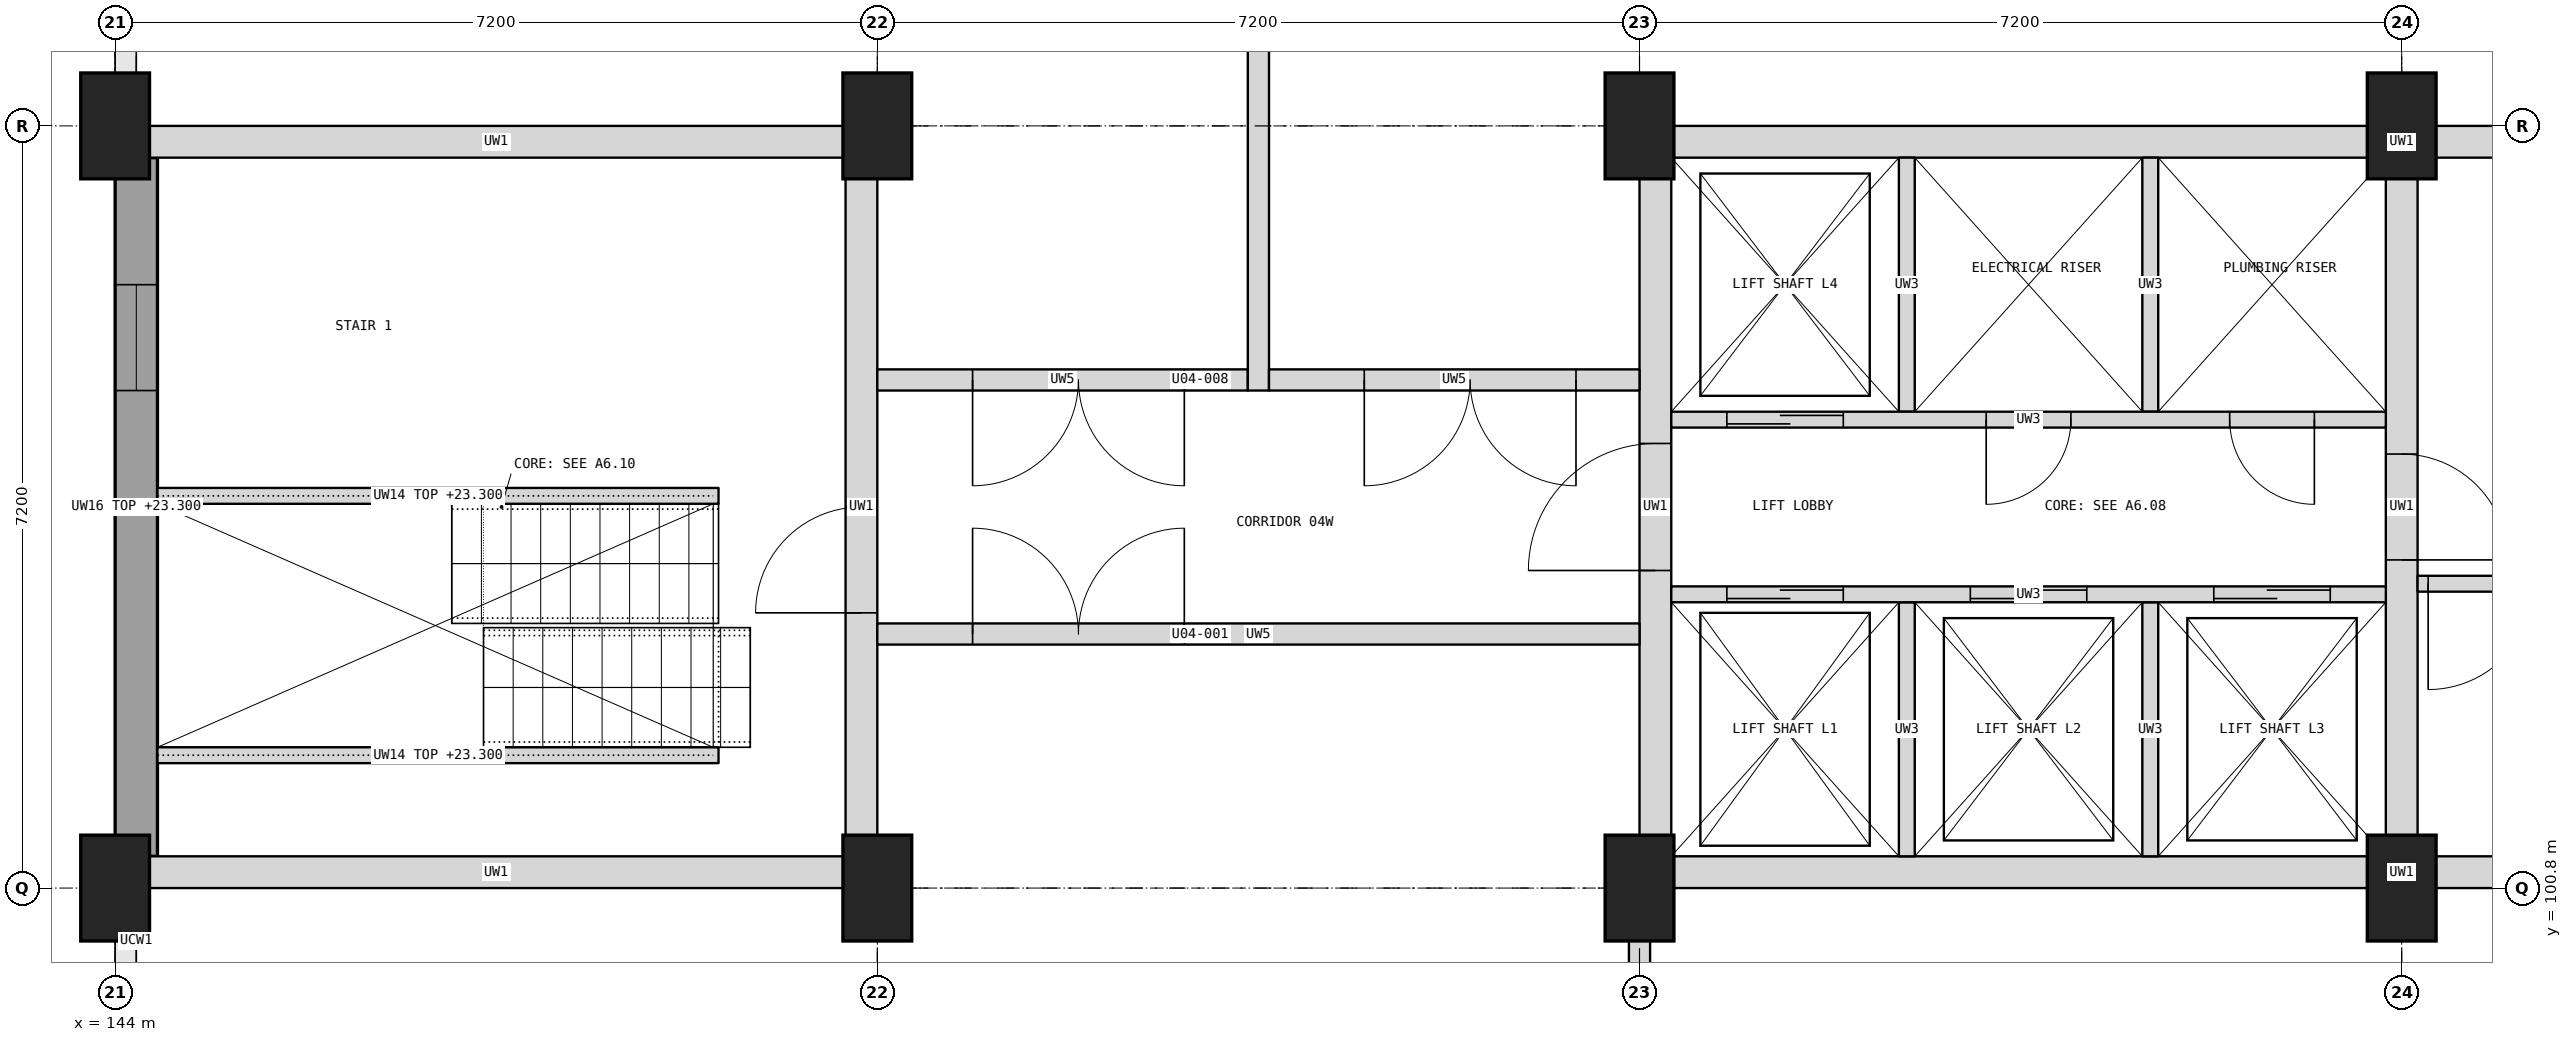
"""IFC4 building model, lengths in metres.
Left out: names, types, materials, properties, quantities, classifications, styles, units other than length and angle.
Written with IfcOpenShell. Run it as: python <this file> out.ifc"""

import sys

from ifc_helpers import new_model, si_unit, direction, frame, frame_2d, origin, origin_2d, place, context, subcontext, project, spatial, rectangle, extrude, element, fill, save


model = new_model("IFC4")
c1 = context("Model", 3, precision=1e-05, world=origin(), true_north=direction((0.0, 1.0)))
c2 = subcontext(c1, "Body", "Model", "MODEL_VIEW")
j1 = project(units=[si_unit("LENGTHUNIT", "METRE"), si_unit("PLANEANGLEUNIT", "RADIAN")], contexts=[c1])
p1 = place(None, origin())
s1 = spatial("IfcSite", under=j1, at=p1, CompositionType="ELEMENT")
p2 = place(p1, origin())
s2 = spatial("IfcBuilding", under=s1, at=p2, CompositionType="ELEMENT")
p3 = place(p2, frame((0.0, 0.0, 19.9)))
s3 = spatial("IfcBuildingStorey", under=s2, at=p3, CompositionType="ELEMENT", Elevation=19.9)
for number, where, z_axis, x_axis in (
    (1, (144.0, 100.8, 0.0), (0.0, 0.0, 1.0), (1.0, 0.0, 0.0)),
    (2, (144.0, 108.0, 0.0), (0.0, 0.0, 1.0), (1.0, 0.0, 0.0)),
    (3, (151.2, 100.8, 0.0), (0.0, 0.0, 1.0), (1.0, 0.0, 0.0)),
    (4, (151.2, 108.0, 0.0), (0.0, 0.0, 1.0), (1.0, 0.0, 0.0)),
    (5, (158.4, 100.8, 0.0), (0.0, 0.0, 1.0), (1.0, 0.0, 0.0)),
    (6, (158.4, 108.0, 0.0), (0.0, 0.0, 1.0), (1.0, 0.0, 0.0)),
    (7, (165.6, 100.8, 0.0), (0.0, 0.0, 1.0), (1.0, 0.0, 0.0)),
    (8, (165.6, 108.0, 0.0), (0.0, 0.0, 1.0), (1.0, 0.0, 0.0)),
):
    element("IfcColumn", number, at=place(p3, frame(where, z_axis=z_axis, x_axis=x_axis)), inside=s3, PredefinedType="COLUMN", context=c2, shape_type="SweptSolid", body=[
        extrude(rectangle(XDim=0.65, YDim=1.0, at=origin_2d()), origin(), (0.0, 0.0, 1.0), 3.4),
    ])
for number, where, z_axis, x_axis in (
    (9, (158.4, 100.95, 0.0), (0.0, 0.0, 1.0), (1.0, 0.0, 0.0)),
    (10, (158.4, 107.85, 0.0), (0.0, 0.0, 1.0), (1.0, 0.0, 0.0)),
):
    element("IfcWall", number, at=place(p3, frame(where, z_axis=z_axis, x_axis=x_axis)), inside=s3, PredefinedType="SHEAR", context=c2, shape_type="SweptSolid", body=[
        extrude(rectangle(XDim=14.4, YDim=0.3, at=frame_2d((7.2, 0.0))), origin(), (0.0, 0.0, 1.0), 3.4),
    ])
p4 = place(p3, frame((158.55, 101.1, 0.0), z_axis=(0.0, 0.0, 1.0), x_axis=(0.0, 1.0, 0.0)))
e11 = element("IfcWall", 11, at=p4, inside=s3, PredefinedType="SHEAR", context=c2, shape_type="SweptSolid", body=[
    extrude(rectangle(XDim=6.6, YDim=0.3, at=frame_2d((3.3, 0.0))), origin(), (0.0, 0.0, 1.0), 3.4),
])
p5 = place(p4, frame((2.7, 0.0, 0.0)))
e12 = element("IfcOpeningElement", 12, at=p5, cuts=e11, PredefinedType="OPENING", context=c2, shape_type="SweptSolid", body=[
    extrude(rectangle(XDim=1.2, YDim=2.1, at=frame_2d((0.6, 1.05))), frame((0.0, 0.16, 0.0), z_axis=(0.0, -1.0, 0.0), x_axis=(1.0, 0.0, 0.0)), (0.0, 0.0, 1.0), 0.32),
])
p6 = place(p3, frame((165.6, 101.1, 0.0), z_axis=(0.0, 0.0, 1.0), x_axis=(0.0, 1.0, 0.0)))
e13 = element("IfcWall", 13, at=p6, inside=s3, PredefinedType="SHEAR", context=c2, shape_type="SweptSolid", body=[
    extrude(rectangle(XDim=6.6, YDim=0.3, at=frame_2d((3.3, 0.0))), origin(), (0.0, 0.0, 1.0), 3.4),
])
p7 = place(p6, frame((2.8, 0.0, 0.0)))
e14 = element("IfcOpeningElement", 14, at=p7, cuts=e13, PredefinedType="OPENING", context=c2, shape_type="SweptSolid", body=[
    extrude(rectangle(XDim=1.0, YDim=2.1, at=frame_2d((0.5, 1.05))), frame((0.0, 0.16, 0.0), z_axis=(0.0, -1.0, 0.0), x_axis=(1.0, 0.0, 0.0)), (0.0, 0.0, 1.0), 0.32),
])
for number, where, z_axis, x_axis in (
    (15, (160.925, 101.1, 0.0), (0.0, 0.0, 1.0), (0.0, 1.0, 0.0)),
    (16, (163.225, 101.1, 0.0), (0.0, 0.0, 1.0), (0.0, 1.0, 0.0)),
    (17, (160.925, 105.3, 0.0), (0.0, 0.0, 1.0), (0.0, 1.0, 0.0)),
    (18, (163.225, 105.3, 0.0), (0.0, 0.0, 1.0), (0.0, 1.0, 0.0)),
):
    element("IfcWall", number, at=place(p3, frame(where, z_axis=z_axis, x_axis=x_axis)), inside=s3, PredefinedType="PARTITIONING", context=c2, shape_type="SweptSolid", body=[
        extrude(rectangle(XDim=2.4, YDim=0.15, at=frame_2d((1.2, 0.0))), origin(), (0.0, 0.0, 1.0), 3.4),
    ])
p8 = place(p3, frame((158.7, 103.575, 0.0), z_axis=(0.0, 0.0, 1.0), x_axis=(1.0, 0.0, 0.0)))
e19 = element("IfcWall", 19, at=p8, inside=s3, PredefinedType="PARTITIONING", context=c2, shape_type="SweptSolid", body=[
    extrude(rectangle(XDim=6.75, YDim=0.15, at=frame_2d((3.375, 0.0))), origin(), (0.0, 0.0, 1.0), 3.4),
])
p9 = place(p8, frame((0.525, 0.0, 0.0)))
e20 = element("IfcOpeningElement", 20, at=p9, cuts=e19, PredefinedType="OPENING", context=c2, shape_type="SweptSolid", body=[
    extrude(rectangle(XDim=1.1, YDim=2.1, at=frame_2d((0.55, 1.05))), frame((0.0, 0.085, 0.0), z_axis=(0.0, -1.0, 0.0), x_axis=(1.0, 0.0, 0.0)), (0.0, 0.0, 1.0), 0.17),
])
p10 = place(p8, frame((2.825, 0.0, 0.0)))
e21 = element("IfcOpeningElement", 21, at=p10, cuts=e19, PredefinedType="OPENING", context=c2, shape_type="SweptSolid", body=[
    extrude(rectangle(XDim=1.1, YDim=2.1, at=frame_2d((0.55, 1.05))), frame((0.0, 0.085, 0.0), z_axis=(0.0, -1.0, 0.0), x_axis=(1.0, 0.0, 0.0)), (0.0, 0.0, 1.0), 0.17),
])
p11 = place(p8, frame((5.125, 0.0, 0.0)))
e22 = element("IfcOpeningElement", 22, at=p11, cuts=e19, PredefinedType="OPENING", context=c2, shape_type="SweptSolid", body=[
    extrude(rectangle(XDim=1.1, YDim=2.1, at=frame_2d((0.55, 1.05))), frame((0.0, 0.085, 0.0), z_axis=(0.0, -1.0, 0.0), x_axis=(1.0, 0.0, 0.0)), (0.0, 0.0, 1.0), 0.17),
])
p12 = place(p3, frame((158.7, 105.225, 0.0), z_axis=(0.0, 0.0, 1.0), x_axis=(1.0, 0.0, 0.0)))
e23 = element("IfcWall", 23, at=p12, inside=s3, PredefinedType="PARTITIONING", context=c2, shape_type="SweptSolid", body=[
    extrude(rectangle(XDim=6.75, YDim=0.15, at=frame_2d((3.375, 0.0))), origin(), (0.0, 0.0, 1.0), 3.4),
])
p13 = place(p12, frame((0.525, 0.0, 0.0)))
e24 = element("IfcOpeningElement", 24, at=p13, cuts=e23, PredefinedType="OPENING", context=c2, shape_type="SweptSolid", body=[
    extrude(rectangle(XDim=1.1, YDim=2.1, at=frame_2d((0.55, 1.05))), frame((0.0, 0.085, 0.0), z_axis=(0.0, -1.0, 0.0), x_axis=(1.0, 0.0, 0.0)), (0.0, 0.0, 1.0), 0.17),
])
p14 = place(p12, frame((2.975, 0.0, 0.0)))
e25 = element("IfcOpeningElement", 25, at=p14, cuts=e23, PredefinedType="OPENING", context=c2, shape_type="SweptSolid", body=[
    extrude(rectangle(XDim=0.8, YDim=2.1, at=frame_2d((0.4, 1.05))), frame((0.0, 0.085, 0.0), z_axis=(0.0, -1.0, 0.0), x_axis=(1.0, 0.0, 0.0)), (0.0, 0.0, 1.0), 0.17),
])
p15 = place(p12, frame((5.275, 0.0, 0.0)))
e26 = element("IfcOpeningElement", 26, at=p15, cuts=e23, PredefinedType="OPENING", context=c2, shape_type="SweptSolid", body=[
    extrude(rectangle(XDim=0.8, YDim=2.1, at=frame_2d((0.4, 1.05))), frame((0.0, 0.085, 0.0), z_axis=(0.0, -1.0, 0.0), x_axis=(1.0, 0.0, 0.0)), (0.0, 0.0, 1.0), 0.17),
])
p16 = place(p3, frame((165.75, 103.675, 0.0), z_axis=(0.0, 0.0, 1.0), x_axis=(1.0, 0.0, 0.0)))
e27 = element("IfcWall", 27, at=p16, inside=s3, PredefinedType="SHEAR", context=c2, shape_type="SweptSolid", body=[
    extrude(rectangle(XDim=6.75, YDim=0.15, at=frame_2d((3.375, 0.0))), origin(), (0.0, 0.0, 1.0), 3.4),
])
p17 = place(p16, frame((0.1, 0.0, 0.0)))
e28 = element("IfcOpeningElement", 28, at=p17, cuts=e27, PredefinedType="OPENING", context=c2, shape_type="SweptSolid", body=[
    extrude(rectangle(XDim=1.0, YDim=2.1, at=frame_2d((0.5, 1.05))), frame((0.0, 0.085, 0.0), z_axis=(0.0, -1.0, 0.0), x_axis=(1.0, 0.0, 0.0)), (0.0, 0.0, 1.0), 0.17),
])
for number, where, z_axis, x_axis in (
    (29, (144.0, 100.95, 0.0), (0.0, 0.0, 1.0), (1.0, 0.0, 0.0)),
    (30, (144.0, 107.85, 0.0), (0.0, 0.0, 1.0), (1.0, 0.0, 0.0)),
):
    element("IfcWall", number, at=place(p3, frame(where, z_axis=z_axis, x_axis=x_axis)), inside=s3, PredefinedType="SHEAR", context=c2, shape_type="SweptSolid", body=[
        extrude(rectangle(XDim=7.2, YDim=0.3, at=frame_2d((3.6, 0.0))), origin(), (0.0, 0.0, 1.0), 3.4),
    ])
p18 = place(p3, frame((151.05, 101.1, 0.0), z_axis=(0.0, 0.0, 1.0), x_axis=(0.0, 1.0, 0.0)))
e31 = element("IfcWall", 31, at=p18, inside=s3, PredefinedType="SHEAR", context=c2, shape_type="SweptSolid", body=[
    extrude(rectangle(XDim=6.6, YDim=0.3, at=frame_2d((3.3, 0.0))), origin(), (0.0, 0.0, 1.0), 3.4),
])
p19 = place(p18, frame((2.3, 0.0, 0.0)))
e32 = element("IfcOpeningElement", 32, at=p19, cuts=e31, PredefinedType="OPENING", context=c2, shape_type="SweptSolid", body=[
    extrude(rectangle(XDim=1.0, YDim=2.1, at=frame_2d((0.5, 1.05))), frame((0.0, 0.16, 0.0), z_axis=(0.0, -1.0, 0.0), x_axis=(1.0, 0.0, 0.0)), (0.0, 0.0, 1.0), 0.32),
])
p20 = place(p3, frame((144.2, 101.1, 0.0), z_axis=(0.0, 0.0, 1.0), x_axis=(0.0, 1.0, 0.0)))
e33 = element("IfcWall", 33, at=p20, inside=s3, PredefinedType="SHEAR", context=c2, shape_type="SweptSolid", body=[
    extrude(rectangle(XDim=6.6, YDim=0.4, at=frame_2d((3.3, 0.0))), origin(), (0.0, 0.0, 1.0), 3.4),
])
p21 = place(p20, frame((4.4, 0.0, 1.0)))
e34 = element("IfcOpeningElement", 34, at=p21, cuts=e33, PredefinedType="OPENING", context=c2, shape_type="SweptSolid", body=[
    extrude(rectangle(XDim=1.0, YDim=1.5, at=frame_2d((0.5, 0.75))), frame((0.0, 0.21, 0.0), z_axis=(0.0, -1.0, 0.0), x_axis=(1.0, 0.0, 0.0)), (0.0, 0.0, 1.0), 0.42),
])
for number, where, z_axis, x_axis in (
    (35, (144.4, 102.055, 0.0), (0.0, 0.0, 1.0), (1.0, 0.0, 0.0)),
    (36, (144.4, 104.505, 0.0), (0.0, 0.0, 1.0), (1.0, 0.0, 0.0)),
):
    element("IfcWall", number, at=place(p3, frame(where, z_axis=z_axis, x_axis=x_axis)), inside=s3, PredefinedType="SHEAR", context=c2, shape_type="SweptSolid", body=[
        extrude(rectangle(XDim=5.3, YDim=0.15, at=frame_2d((2.65, 0.0))), origin(), (0.0, 0.0, 1.0), 3.4),
    ])
p22 = place(p3, frame((151.2, 103.2, 0.0), z_axis=(0.0, 0.0, 1.0), x_axis=(1.0, 0.0, 0.0)))
e37 = element("IfcWall", 37, at=p22, inside=s3, PredefinedType="PARTITIONING", context=c2, shape_type="SweptSolid", body=[
    extrude(rectangle(XDim=7.2, YDim=0.2, at=frame_2d((3.6, 0.0))), origin(), (0.0, 0.0, 1.0), 3.1),
])
p23 = place(p22, frame((0.9, 0.0, 0.0)))
e38 = element("IfcOpeningElement", 38, at=p23, cuts=e37, PredefinedType="OPENING", context=c2, shape_type="SweptSolid", body=[
    extrude(rectangle(XDim=2.0, YDim=2.1, at=frame_2d((1.0, 1.05))), frame((0.0, 0.11, 0.0), z_axis=(0.0, -1.0, 0.0), x_axis=(1.0, 0.0, 0.0)), (0.0, 0.0, 1.0), 0.22),
])
p24 = place(p3, frame((158.4, 94.0, 0.0), z_axis=(0.0, 0.0, 1.0), x_axis=(0.0, 1.0, 0.0)))
e39 = element("IfcWall", 39, at=p24, inside=s3, PredefinedType="PARTITIONING", context=c2, shape_type="SweptSolid", body=[
    extrude(rectangle(XDim=6.35, YDim=0.2, at=frame_2d((3.175, 0.0))), origin(), (0.0, 0.0, 1.0), 2.55),
])
p25 = place(p3, frame((151.2, 105.6, 0.0), z_axis=(0.0, 0.0, 1.0), x_axis=(1.0, 0.0, 0.0)))
e40 = element("IfcWall", 40, at=p25, inside=s3, PredefinedType="PARTITIONING", context=c2, shape_type="SweptSolid", body=[
    extrude(rectangle(XDim=3.5, YDim=0.2, at=frame_2d((1.75, 0.0))), origin(), (0.0, 0.0, 1.0), 3.1),
])
p26 = place(p25, frame((0.9, 0.0, 0.0)))
e41 = element("IfcOpeningElement", 41, at=p26, cuts=e40, PredefinedType="OPENING", context=c2, shape_type="SweptSolid", body=[
    extrude(rectangle(XDim=2.0, YDim=2.1, at=frame_2d((1.0, 1.05))), frame((0.0, 0.11, 0.0), z_axis=(0.0, -1.0, 0.0), x_axis=(1.0, 0.0, 0.0)), (0.0, 0.0, 1.0), 0.22),
])
p27 = place(p3, frame((154.8, 105.5, 0.0), z_axis=(0.0, 0.0, 1.0), x_axis=(0.0, 1.0, 0.0)))
e42 = element("IfcWall", 42, at=p27, inside=s3, PredefinedType="PARTITIONING", context=c2, shape_type="SweptSolid", body=[
    extrude(rectangle(XDim=9.3, YDim=0.2, at=frame_2d((4.65, 0.0))), origin(), (0.0, 0.0, 1.0), 3.1),
])
p28 = place(p3, frame((154.9, 105.6, 0.0), z_axis=(0.0, 0.0, 1.0), x_axis=(1.0, 0.0, 0.0)))
e43 = element("IfcWall", 43, at=p28, inside=s3, PredefinedType="PARTITIONING", context=c2, shape_type="SweptSolid", body=[
    extrude(rectangle(XDim=3.5, YDim=0.2, at=frame_2d((1.75, 0.0))), origin(), (0.0, 0.0, 1.0), 3.1),
])
p29 = place(p28, frame((0.9, 0.0, 0.0)))
e44 = element("IfcOpeningElement", 44, at=p29, cuts=e43, PredefinedType="OPENING", context=c2, shape_type="SweptSolid", body=[
    extrude(rectangle(XDim=2.0, YDim=2.1, at=frame_2d((1.0, 1.05))), frame((0.0, 0.11, 0.0), z_axis=(0.0, -1.0, 0.0), x_axis=(1.0, 0.0, 0.0)), (0.0, 0.0, 1.0), 0.22),
])
p30 = place(p21, origin())
e45 = element("IfcWindow", 45, at=p30, inside=s3, PartitioningType="SINGLE_PANEL", PredefinedType="WINDOW", context=c2, shape_type="SweptSolid", body=[
    extrude(rectangle(XDim=1.0, YDim=1.5, at=frame_2d((0.5, 0.75))), frame((0.0, 0.03, 0.0), z_axis=(0.0, -1.0, 0.0), x_axis=(1.0, 0.0, 0.0)), (0.0, 0.0, 1.0), 0.06),
])
fill(e34, e45)
p31 = place(p23, origin())
e46 = element("IfcDoor", 46, at=p31, inside=s3, OperationType="DOUBLE_DOOR_SINGLE_SWING", PredefinedType="DOOR", context=c2, shape_type="SweptSolid", body=[
    extrude(rectangle(XDim=2.0, YDim=2.1, at=frame_2d((1.0, 1.05))), frame((0.0, 0.025, 0.0), z_axis=(0.0, -1.0, 0.0), x_axis=(1.0, 0.0, 0.0)), (0.0, 0.0, 1.0), 0.05),
])
fill(e38, e46)
p32 = place(p26, frame((2.0, 0.0, 0.0), z_axis=(0.0, 0.0, 1.0), x_axis=(-1.0, 0.0, 0.0)))
e47 = element("IfcDoor", 47, at=p32, inside=s3, OperationType="DOUBLE_DOOR_SINGLE_SWING", PredefinedType="DOOR", context=c2, shape_type="SweptSolid", body=[
    extrude(rectangle(XDim=2.0, YDim=2.1, at=frame_2d((1.0, 1.05))), frame((0.0, 0.025, 0.0), z_axis=(0.0, -1.0, 0.0), x_axis=(1.0, 0.0, 0.0)), (0.0, 0.0, 1.0), 0.05),
])
fill(e41, e47)
p33 = place(p29, frame((2.0, 0.0, 0.0), z_axis=(0.0, 0.0, 1.0), x_axis=(-1.0, 0.0, 0.0)))
e48 = element("IfcDoor", 48, at=p33, inside=s3, OperationType="DOUBLE_DOOR_SINGLE_SWING", PredefinedType="DOOR", context=c2, shape_type="SweptSolid", body=[
    extrude(rectangle(XDim=2.0, YDim=2.1, at=frame_2d((1.0, 1.05))), frame((0.0, 0.025, 0.0), z_axis=(0.0, -1.0, 0.0), x_axis=(1.0, 0.0, 0.0)), (0.0, 0.0, 1.0), 0.05),
])
fill(e44, e48)
p34 = place(p9, origin())
e49 = element("IfcDoor", 49, at=p34, inside=s3, OperationType="DOUBLE_DOOR_SLIDING", PredefinedType="DOOR", context=c2, shape_type="SweptSolid", body=[
    extrude(rectangle(XDim=1.1, YDim=2.1, at=frame_2d((0.55, 1.05))), frame((0.0, 0.025, 0.0), z_axis=(0.0, -1.0, 0.0), x_axis=(1.0, 0.0, 0.0)), (0.0, 0.0, 1.0), 0.05),
])
fill(e20, e49)
p35 = place(p10, origin())
e50 = element("IfcDoor", 50, at=p35, inside=s3, OperationType="DOUBLE_DOOR_SLIDING", PredefinedType="DOOR", context=c2, shape_type="SweptSolid", body=[
    extrude(rectangle(XDim=1.1, YDim=2.1, at=frame_2d((0.55, 1.05))), frame((0.0, 0.025, 0.0), z_axis=(0.0, -1.0, 0.0), x_axis=(1.0, 0.0, 0.0)), (0.0, 0.0, 1.0), 0.05),
])
fill(e21, e50)
p36 = place(p11, origin())
e51 = element("IfcDoor", 51, at=p36, inside=s3, OperationType="DOUBLE_DOOR_SLIDING", PredefinedType="DOOR", context=c2, shape_type="SweptSolid", body=[
    extrude(rectangle(XDim=1.1, YDim=2.1, at=frame_2d((0.55, 1.05))), frame((0.0, 0.025, 0.0), z_axis=(0.0, -1.0, 0.0), x_axis=(1.0, 0.0, 0.0)), (0.0, 0.0, 1.0), 0.05),
])
fill(e22, e51)
p37 = place(p13, origin())
e52 = element("IfcDoor", 52, at=p37, inside=s3, OperationType="DOUBLE_DOOR_SLIDING", PredefinedType="DOOR", context=c2, shape_type="SweptSolid", body=[
    extrude(rectangle(XDim=1.1, YDim=2.1, at=frame_2d((0.55, 1.05))), frame((0.0, 0.025, 0.0), z_axis=(0.0, -1.0, 0.0), x_axis=(1.0, 0.0, 0.0)), (0.0, 0.0, 1.0), 0.05),
])
fill(e24, e52)
p38 = place(p14, frame((0.8, 0.0, 0.0), z_axis=(0.0, 0.0, 1.0), x_axis=(-1.0, 0.0, 0.0)))
e53 = element("IfcDoor", 53, at=p38, inside=s3, OperationType="SINGLE_SWING_RIGHT", PredefinedType="DOOR", context=c2, shape_type="SweptSolid", body=[
    extrude(rectangle(XDim=0.8, YDim=2.1, at=frame_2d((0.4, 1.05))), frame((0.0, 0.025, 0.0), z_axis=(0.0, -1.0, 0.0), x_axis=(1.0, 0.0, 0.0)), (0.0, 0.0, 1.0), 0.05),
])
fill(e25, e53)
p39 = place(p15, frame((0.8, 0.0, 0.0), z_axis=(0.0, 0.0, 1.0), x_axis=(-1.0, 0.0, 0.0)))
e54 = element("IfcDoor", 54, at=p39, inside=s3, OperationType="SINGLE_SWING_LEFT", PredefinedType="DOOR", context=c2, shape_type="SweptSolid", body=[
    extrude(rectangle(XDim=0.8, YDim=2.1, at=frame_2d((0.4, 1.05))), frame((0.0, 0.025, 0.0), z_axis=(0.0, -1.0, 0.0), x_axis=(1.0, 0.0, 0.0)), (0.0, 0.0, 1.0), 0.05),
])
fill(e26, e54)
p40 = place(p5, origin())
e55 = element("IfcDoor", 55, at=p40, inside=s3, OperationType="SINGLE_SWING_LEFT", PredefinedType="DOOR", context=c2, shape_type="SweptSolid", body=[
    extrude(rectangle(XDim=1.2, YDim=2.1, at=frame_2d((0.6, 1.05))), frame((0.0, 0.025, 0.0), z_axis=(0.0, -1.0, 0.0), x_axis=(1.0, 0.0, 0.0)), (0.0, 0.0, 1.0), 0.05),
])
fill(e12, e55)
p41 = place(p7, frame((1.0, 0.0, 0.0), z_axis=(0.0, 0.0, 1.0), x_axis=(-1.0, 0.0, 0.0)))
e56 = element("IfcDoor", 56, at=p41, inside=s3, OperationType="SINGLE_SWING_RIGHT", PredefinedType="DOOR", context=c2, shape_type="SweptSolid", body=[
    extrude(rectangle(XDim=1.0, YDim=2.1, at=frame_2d((0.5, 1.05))), frame((0.0, 0.025, 0.0), z_axis=(0.0, -1.0, 0.0), x_axis=(1.0, 0.0, 0.0)), (0.0, 0.0, 1.0), 0.05),
])
fill(e14, e56)
p42 = place(p17, frame((1.0, 0.0, 0.0), z_axis=(0.0, 0.0, 1.0), x_axis=(-1.0, 0.0, 0.0)))
e57 = element("IfcDoor", 57, at=p42, inside=s3, OperationType="SINGLE_SWING_RIGHT", PredefinedType="DOOR", context=c2, shape_type="SweptSolid", body=[
    extrude(rectangle(XDim=1.0, YDim=2.1, at=frame_2d((0.5, 1.05))), frame((0.0, 0.025, 0.0), z_axis=(0.0, -1.0, 0.0), x_axis=(1.0, 0.0, 0.0)), (0.0, 0.0, 1.0), 0.05),
])
fill(e28, e57)
p43 = place(p19, origin())
e58 = element("IfcDoor", 58, at=p43, inside=s3, OperationType="SINGLE_SWING_LEFT", PredefinedType="DOOR", context=c2, shape_type="SweptSolid", body=[
    extrude(rectangle(XDim=1.0, YDim=2.1, at=frame_2d((0.5, 1.05))), frame((0.0, 0.025, 0.0), z_axis=(0.0, -1.0, 0.0), x_axis=(1.0, 0.0, 0.0)), (0.0, 0.0, 1.0), 0.05),
])
fill(e32, e58)
save(model, sys.argv[1])
